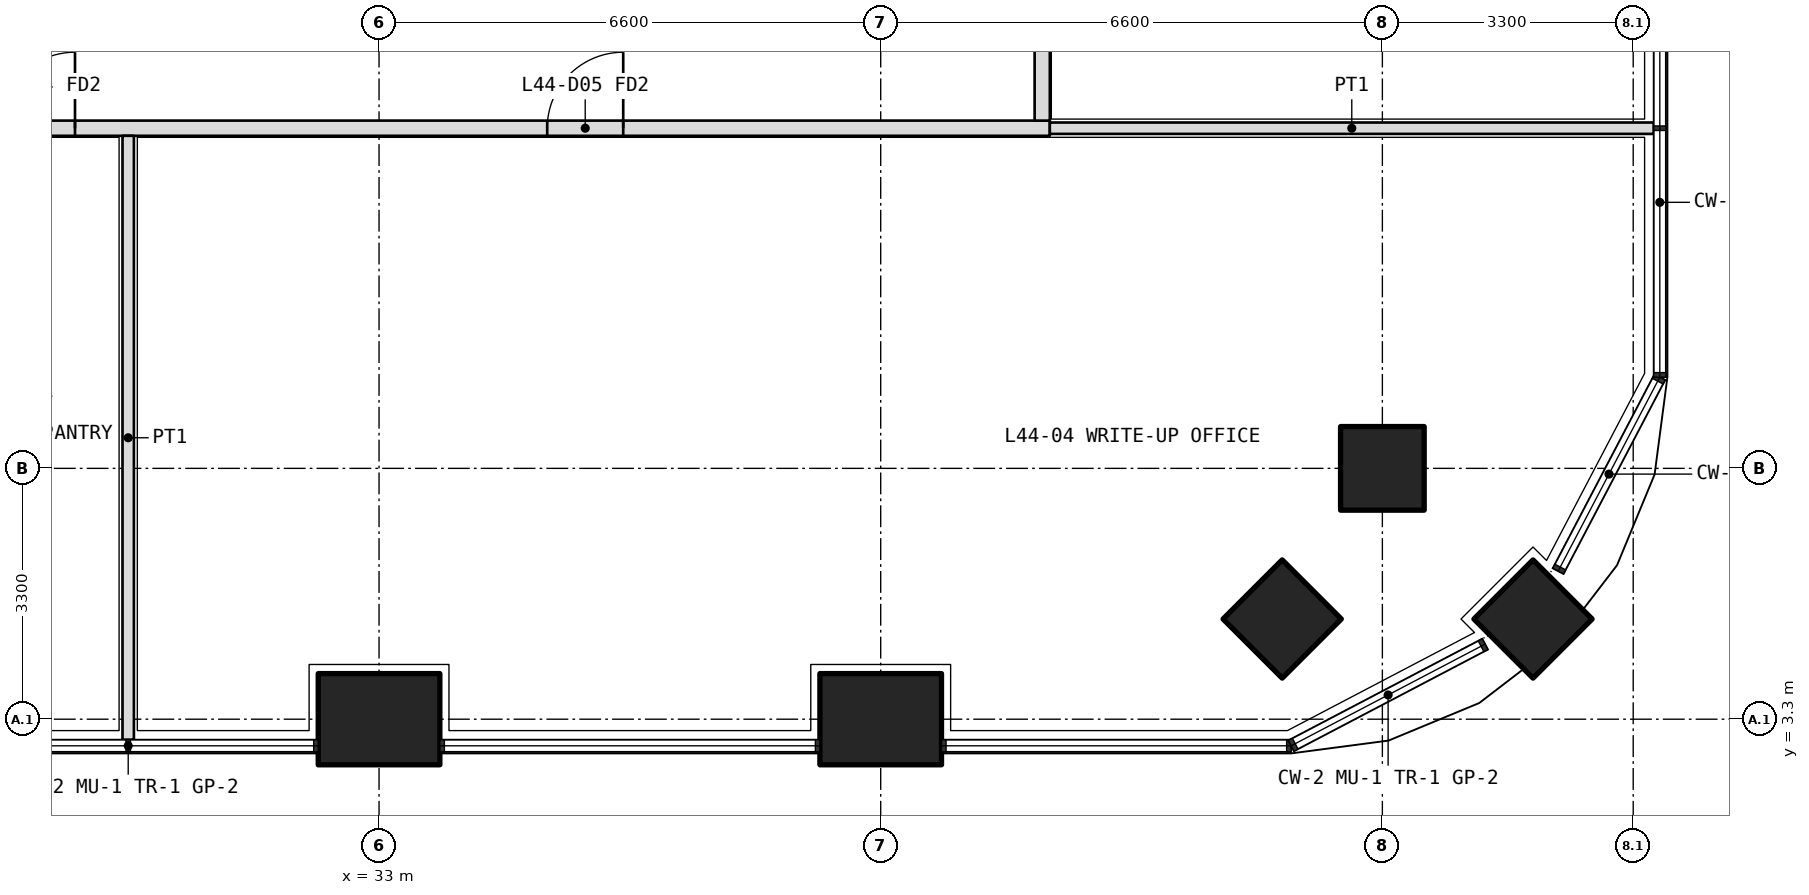
"""IFC4 building model, lengths in metres.
Left out: names, types, materials, properties, quantities, classifications, styles, units other than length and angle.
Written with IfcOpenShell. Run it as: python <this file> out.ifc"""

import sys

from ifc_helpers import new_model, si_unit, direction, frame, frame_2d, origin, origin_2d, place, context, subcontext, project, spatial, rectangle, extrude, element, fill, save


model = new_model("IFC4")
c1 = context("Model", 3, precision=1e-05, world=origin(), true_north=direction((0.0, 1.0)))
c2 = subcontext(c1, "Body", "Model", "MODEL_VIEW")
j1 = project(units=[si_unit("LENGTHUNIT", "METRE"), si_unit("PLANEANGLEUNIT", "RADIAN")], contexts=[c1])
p1 = place(None, origin())
s1 = spatial("IfcSite", under=j1, at=p1, CompositionType="ELEMENT")
p2 = place(p1, origin())
s2 = spatial("IfcBuilding", under=s1, at=p2, CompositionType="ELEMENT")
p3 = place(p2, frame((0.0, 0.0, 193.5)))
s3 = spatial("IfcBuildingStorey", under=s2, at=p3, CompositionType="ELEMENT", Elevation=193.5)
p4 = place(p3, frame((48.182, 4.618, 0.0), z_axis=(0.0, 0.0, 1.0), x_axis=(0.707106781187, 0.707106781187, 0.0)))
e1 = element("IfcColumn", 1, at=p4, inside=s3, PredefinedType="COLUMN", context=c2, shape_type="SweptSolid", body=[
    extrude(rectangle(XDim=1.1, YDim=1.1, at=origin_2d()), origin(), (0.0, 0.0, 1.0), 4.2),
])
for number, where, z_axis, x_axis in (
    (2, (33.0, 3.3, 0.0), (0.0, 0.0, 1.0), (1.0, 0.0, 0.0)),
    (3, (39.6, 3.3, 0.0), (0.0, 0.0, 1.0), (1.0, 0.0, 0.0)),
):
    element("IfcColumn", number, at=place(p3, frame(where, z_axis=z_axis, x_axis=x_axis)), inside=s3, PredefinedType="COLUMN", context=c2, shape_type="SweptSolid", body=[
        extrude(rectangle(XDim=1.6, YDim=1.2, at=origin_2d()), origin(), (0.0, 0.0, 1.0), 4.2),
    ])
for number, where, z_axis, x_axis in (
    (4, (46.2, 6.6, 0.0), (0.0, 0.0, 1.0), (1.0, 0.0, 0.0)),
    (5, (44.882, 4.618, 0.0), (0.0, 0.0, 1.0), (0.707, 0.707, 0.0)),
):
    element("IfcColumn", number, at=place(p3, frame(where, z_axis=z_axis, x_axis=x_axis)), inside=s3, PredefinedType="COLUMN", context=c2, shape_type="SweptSolid", body=[
        extrude(rectangle(XDim=1.1, YDim=1.1, at=origin_2d()), origin(), (0.0, 0.0, 1.0), 4.2),
    ])
p5 = place(p3, frame((10.975, 11.075, 0.0), z_axis=(0.0, 0.0, 1.0), x_axis=(1.0, 0.0, 0.0)))
e6 = element("IfcWall", 6, at=p5, inside=s3, PredefinedType="PARTITIONING", context=c2, shape_type="SweptSolid", body=[
    extrude(rectangle(XDim=30.85, YDim=0.2, at=frame_2d((15.425, 0.0))), origin(), (0.0, 0.0, 1.0), 2.85),
])
p6 = place(p5, frame((5.512, 0.0, 0.0)))
e7 = element("IfcOpeningElement", 7, at=p6, cuts=e6, PredefinedType="OPENING", context=c2, shape_type="SweptSolid", body=[
    extrude(rectangle(XDim=1.2, YDim=2.1, at=frame_2d((0.6, 1.05))), frame((0.0, 0.11, 0.0), z_axis=(0.0, -1.0, 0.0), x_axis=(1.0, 0.0, 0.0)), (0.0, 0.0, 1.0), 0.22),
])
p7 = place(p5, frame((13.725, 0.0, 0.0)))
e8 = element("IfcOpeningElement", 8, at=p7, cuts=e6, PredefinedType="OPENING", context=c2, shape_type="SweptSolid", body=[
    extrude(rectangle(XDim=1.0, YDim=2.1, at=frame_2d((0.5, 1.05))), frame((0.0, 0.11, 0.0), z_axis=(0.0, -1.0, 0.0), x_axis=(1.0, 0.0, 0.0)), (0.0, 0.0, 1.0), 0.22),
])
p8 = place(p5, frame((17.025, 0.0, 0.0)))
e9 = element("IfcOpeningElement", 9, at=p8, cuts=e6, PredefinedType="OPENING", context=c2, shape_type="SweptSolid", body=[
    extrude(rectangle(XDim=1.0, YDim=2.1, at=frame_2d((0.5, 1.05))), frame((0.0, 0.11, 0.0), z_axis=(0.0, -1.0, 0.0), x_axis=(1.0, 0.0, 0.0)), (0.0, 0.0, 1.0), 0.22),
])
p9 = place(p5, frame((24.238, 0.0, 0.0)))
e10 = element("IfcOpeningElement", 10, at=p9, cuts=e6, PredefinedType="OPENING", context=c2, shape_type="SweptSolid", body=[
    extrude(rectangle(XDim=1.0, YDim=2.1, at=frame_2d((0.5, 1.05))), frame((0.0, 0.11, 0.0), z_axis=(0.0, -1.0, 0.0), x_axis=(1.0, 0.0, 0.0)), (0.0, 0.0, 1.0), 0.22),
])
p10 = place(p3, frame((41.725, 11.175, 0.0), z_axis=(0.0, 0.0, 1.0), x_axis=(0.0, 1.0, 0.0)))
e11 = element("IfcWall", 11, at=p10, inside=s3, PredefinedType="PARTITIONING", context=c2, shape_type="SweptSolid", body=[
    extrude(rectangle(XDim=18.525, YDim=0.2, at=frame_2d((9.262, 0.0))), origin(), (0.0, 0.0, 1.0), 2.85),
])
p11 = place(p10, frame((2.113, 0.0, 0.0)))
e12 = element("IfcOpeningElement", 12, at=p11, cuts=e11, PredefinedType="OPENING", context=c2, shape_type="SweptSolid", body=[
    extrude(rectangle(XDim=1.0, YDim=2.1, at=frame_2d((0.5, 1.05))), frame((0.0, 0.11, 0.0), z_axis=(0.0, -1.0, 0.0), x_axis=(1.0, 0.0, 0.0)), (0.0, 0.0, 1.0), 0.22),
])
p12 = place(p10, frame((6.375, 0.0, 0.0)))
e13 = element("IfcOpeningElement", 13, at=p12, cuts=e11, PredefinedType="OPENING", context=c2, shape_type="SweptSolid", body=[
    extrude(rectangle(XDim=1.2, YDim=2.1, at=frame_2d((0.6, 1.05))), frame((0.0, 0.11, 0.0), z_axis=(0.0, -1.0, 0.0), x_axis=(1.0, 0.0, 0.0)), (0.0, 0.0, 1.0), 0.22),
])
p13 = place(p10, frame((9.625, 0.0, 0.0)))
e14 = element("IfcOpeningElement", 14, at=p13, cuts=e11, PredefinedType="OPENING", context=c2, shape_type="SweptSolid", body=[
    extrude(rectangle(XDim=1.0, YDim=2.1, at=frame_2d((0.5, 1.05))), frame((0.0, 0.11, 0.0), z_axis=(0.0, -1.0, 0.0), x_axis=(1.0, 0.0, 0.0)), (0.0, 0.0, 1.0), 0.22),
])
p14 = place(p10, frame((12.975, 0.0, 0.0)))
e15 = element("IfcOpeningElement", 15, at=p14, cuts=e11, PredefinedType="OPENING", context=c2, shape_type="SweptSolid", body=[
    extrude(rectangle(XDim=0.9, YDim=2.1, at=frame_2d((0.45, 1.05))), frame((0.0, 0.11, 0.0), z_axis=(0.0, -1.0, 0.0), x_axis=(1.0, 0.0, 0.0)), (0.0, 0.0, 1.0), 0.22),
])
p15 = place(p10, frame((16.375, 0.0, 0.0)))
e16 = element("IfcOpeningElement", 16, at=p15, cuts=e11, PredefinedType="OPENING", context=c2, shape_type="SweptSolid", body=[
    extrude(rectangle(XDim=1.0, YDim=2.1, at=frame_2d((0.5, 1.05))), frame((0.0, 0.11, 0.0), z_axis=(0.0, -1.0, 0.0), x_axis=(1.0, 0.0, 0.0)), (0.0, 0.0, 1.0), 0.22),
])
for number, where, z_axis, x_axis in (
    (17, (49.77, 11.075, 0.0), (0.0, 0.0, 1.0), (-1.0, 0.0, 0.0)),
    (18, (29.7, 3.03, 0.0), (0.0, 0.0, 1.0), (0.0, 1.0, 0.0)),
):
    element("IfcWall", number, at=place(p3, frame(where, z_axis=z_axis, x_axis=x_axis)), inside=s3, PredefinedType="PARTITIONING", context=c2, shape_type="SweptSolid", body=[
        extrude(rectangle(XDim=7.945, YDim=0.15, at=frame_2d((3.973, 0.0))), origin(), (0.0, 0.0, 1.0), 2.7),
    ])
p16 = place(p8, origin())
e19 = element("IfcDoor", 19, at=p16, inside=s3, OperationType="SINGLE_SWING_RIGHT", PredefinedType="DOOR", context=c2, shape_type="SweptSolid", body=[
    extrude(rectangle(XDim=1.0, YDim=2.1, at=frame_2d((0.5, 1.05))), frame((0.0, 0.025, 0.0), z_axis=(0.0, -1.0, 0.0), x_axis=(1.0, 0.0, 0.0)), (0.0, 0.0, 1.0), 0.05),
])
fill(e9, e19)
p17 = place(p9, origin())
e20 = element("IfcDoor", 20, at=p17, inside=s3, OperationType="SINGLE_SWING_RIGHT", PredefinedType="DOOR", context=c2, shape_type="SweptSolid", body=[
    extrude(rectangle(XDim=1.0, YDim=2.1, at=frame_2d((0.5, 1.05))), frame((0.0, 0.025, 0.0), z_axis=(0.0, -1.0, 0.0), x_axis=(1.0, 0.0, 0.0)), (0.0, 0.0, 1.0), 0.05),
])
fill(e10, e20)
save(model, sys.argv[1])
